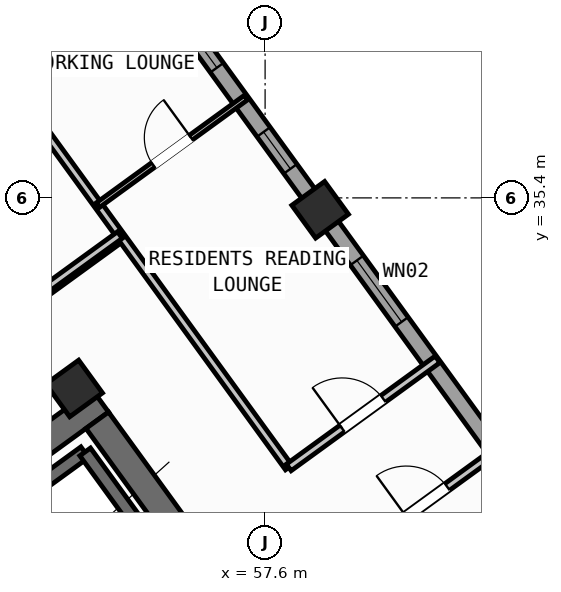
"""IFC4 building model, lengths in metres.
Left out: names, types, materials, properties, quantities, classifications, styles, units other than length and angle.
Written with IfcOpenShell. Run it as: python <this file> out.ifc"""

import sys

from ifc_helpers import new_model, si_unit, direction, frame, frame_2d, origin, origin_2d, place, context, subcontext, project, spatial, rectangle, hollow_rectangle, extrude, source, transform, mapped, element, fill, save


model = new_model("IFC4")
c1 = context("Model", 3, precision=1e-05, world=origin(), true_north=direction((0.0, 1.0)))
c2 = subcontext(c1, "Body", "Model", "MODEL_VIEW")
j1 = project(units=[si_unit("LENGTHUNIT", "METRE"), si_unit("PLANEANGLEUNIT", "RADIAN")], contexts=[c1])
p1 = place(None, origin())
s1 = spatial("IfcSite", under=j1, at=p1, CompositionType="ELEMENT")
p2 = place(p1, origin())
s2 = spatial("IfcBuilding", under=s1, at=p2, CompositionType="ELEMENT")
p3 = place(p2, frame((0.0, 0.0, 184.2)))
s3 = spatial("IfcBuildingStorey", under=s2, at=p3, CompositionType="ELEMENT", Elevation=184.2)
p4 = place(p3, frame((44.365, 24.142, 0.0), z_axis=(0.0, 0.0, 1.0), x_axis=(0.809024304885, 0.587775190107, 0.0)))
e1 = element("IfcWall", 1, at=p4, inside=s3, PredefinedType="SHEAR", context=c2, shape_type="SweptSolid", body=[
    extrude(rectangle(XDim=12.34, YDim=0.55, at=frame_2d((6.17, 0.0))), origin(), (0.0, 0.0, 1.0), 3.35),
])
p5 = place(p3, frame((58.064, 25.813, 0.0), z_axis=(0.0, 0.0, 1.0), x_axis=(-0.587764933797, 0.809031756236, 0.0)))
e2 = element("IfcWall", 2, at=p5, inside=s3, PredefinedType="SHEAR", context=c2, shape_type="SweptSolid", body=[
    extrude(rectangle(XDim=6.425, YDim=0.55, at=frame_2d((3.212, 0.0))), origin(), (0.0, 0.0, 1.0), 3.35),
])
m1 = source(origin(), c2, "Body", "SweptSolid", [
    extrude(hollow_rectangle(XDim=0.8, YDim=0.8, WallThickness=0.032, at=origin_2d()), origin(), (0.0, 0.0, 1.0), 3.6),
])
for number, where, z_axis, x_axis in (
    (3, (53.832, 31.638, 0.0), (0.0, 0.0, 1.0), (0.809, 0.588, 0.0)),
    (4, (58.686, 35.165, 0.0), (0.0, 0.0, 1.0), (0.809, 0.588, 0.0)),
):
    element("IfcColumn", number, at=place(p3, frame(where, z_axis=z_axis, x_axis=x_axis)), inside=s3, PredefinedType="COLUMN", context=c2, shape_type="MappedRepresentation", body=[
        mapped(m1, transform((0.0, 0.0, 0.0), scale=1.0)),
    ])
p6 = place(p3, frame((42.207, 31.597, 0.0), z_axis=(0.0, 0.0, 1.0), x_axis=(0.809020333377, 0.587780656523, 0.0)))
e5 = element("IfcWall", 5, at=p6, inside=s3, PredefinedType="STANDARD", context=c2, shape_type="SweptSolid", body=[
    extrude(rectangle(XDim=15.223, YDim=0.32, at=frame_2d((7.611, 0.0))), origin(), (0.0, 0.0, 1.0), 3.35),
])
p7 = place(p6, frame((12.82, 0.0, 0.0)))
e6 = element("IfcOpeningElement", 6, at=p7, cuts=e5, PredefinedType="OPENING", context=c2, shape_type="SweptSolid", body=[
    extrude(rectangle(XDim=1.05, YDim=2.15, at=frame_2d((0.525, 1.075))), frame((0.0, 0.17, 0.0), z_axis=(0.0, -1.0, 0.0), x_axis=(1.0, 0.0, 0.0)), (0.0, 0.0, 1.0), 0.34),
])
p8 = place(p6, frame((0.775, 0.0, 0.85)))
e7 = element("IfcOpeningElement", 7, at=p8, cuts=e5, PredefinedType="OPENING", context=c2, shape_type="SweptSolid", body=[
    extrude(rectangle(XDim=1.8, YDim=1.5, at=frame_2d((0.9, 0.75))), frame((0.0, 0.17, 0.0), z_axis=(0.0, -1.0, 0.0), x_axis=(1.0, 0.0, 0.0)), (0.0, 0.0, 1.0), 0.34),
])
p9 = place(p6, frame((5.544, 0.0, 0.85)))
e8 = element("IfcOpeningElement", 8, at=p9, cuts=e5, PredefinedType="OPENING", context=c2, shape_type="SweptSolid", body=[
    extrude(rectangle(XDim=1.8, YDim=1.5, at=frame_2d((0.9, 0.75))), frame((0.0, 0.17, 0.0), z_axis=(0.0, -1.0, 0.0), x_axis=(1.0, 0.0, 0.0)), (0.0, 0.0, 1.0), 0.34),
])
p10 = place(p6, frame((10.219, 0.0, 1.0)))
e9 = element("IfcOpeningElement", 9, at=p10, cuts=e5, PredefinedType="OPENING", context=c2, shape_type="SweptSolid", body=[
    extrude(rectangle(XDim=0.9, YDim=1.25, at=frame_2d((0.45, 0.625))), frame((0.0, 0.17, 0.0), z_axis=(0.0, -1.0, 0.0), x_axis=(1.0, 0.0, 0.0)), (0.0, 0.0, 1.0), 0.34),
])
p11 = place(p3, frame((54.81, 40.5, 0.0), z_axis=(0.0, 0.0, 1.0), x_axis=(0.587783625747, -0.809018176127, 0.0)))
e10 = element("IfcWall", 10, at=p11, inside=s3, PredefinedType="STANDARD", context=c2, shape_type="SweptSolid", body=[
    extrude(rectangle(XDim=21.587, YDim=0.32, at=frame_2d((10.794, 0.0))), origin(), (0.0, 0.0, 1.0), 2.825),
])
p12 = place(p11, frame((1.328, 0.0, 0.85)))
e11 = element("IfcOpeningElement", 11, at=p12, cuts=e10, PredefinedType="OPENING", context=c2, shape_type="SweptSolid", body=[
    extrude(rectangle(XDim=1.8, YDim=1.5, at=frame_2d((0.9, 0.75))), frame((0.0, 0.17, 0.0), z_axis=(0.0, -1.0, 0.0), x_axis=(1.0, 0.0, 0.0)), (0.0, 0.0, 1.0), 0.34),
])
p13 = place(p11, frame((4.695, 0.0, 1.0)))
e12 = element("IfcOpeningElement", 12, at=p13, cuts=e10, PredefinedType="OPENING", context=c2, shape_type="SweptSolid", body=[
    extrude(rectangle(XDim=0.9, YDim=1.25, at=frame_2d((0.45, 0.625))), frame((0.0, 0.17, 0.0), z_axis=(0.0, -1.0, 0.0), x_axis=(1.0, 0.0, 0.0)), (0.0, 0.0, 1.0), 0.34),
])
p14 = place(p11, frame((7.829, 0.0, 0.85)))
e13 = element("IfcOpeningElement", 13, at=p14, cuts=e10, PredefinedType="OPENING", context=c2, shape_type="SweptSolid", body=[
    extrude(rectangle(XDim=1.5, YDim=1.5, at=frame_2d((0.75, 0.75))), frame((0.0, 0.17, 0.0), z_axis=(0.0, -1.0, 0.0), x_axis=(1.0, 0.0, 0.0)), (0.0, 0.0, 1.0), 0.34),
])
p15 = place(p11, frame((15.542, 0.0, 0.95)))
e14 = element("IfcOpeningElement", 14, at=p15, cuts=e10, PredefinedType="OPENING", context=c2, shape_type="SweptSolid", body=[
    extrude(rectangle(XDim=1.2, YDim=1.4, at=frame_2d((0.6, 0.7))), frame((0.0, 0.17, 0.0), z_axis=(0.0, -1.0, 0.0), x_axis=(1.0, 0.0, 0.0)), (0.0, 0.0, 1.0), 0.34),
])
p16 = place(p11, frame((19.097, 0.0, 1.0)))
e15 = element("IfcOpeningElement", 15, at=p16, cuts=e10, PredefinedType="OPENING", context=c2, shape_type="SweptSolid", body=[
    extrude(rectangle(XDim=0.9, YDim=1.25, at=frame_2d((0.45, 0.625))), frame((0.0, 0.17, 0.0), z_axis=(0.0, -1.0, 0.0), x_axis=(1.0, 0.0, 0.0)), (0.0, 0.0, 1.0), 0.34),
])
p17 = place(p3, frame((48.006, 25.996, 0.0), z_axis=(0.0, 0.0, 1.0), x_axis=(0.80901903764, 0.587782439969, 0.0)))
e16 = element("IfcWall", 16, at=p17, inside=s3, PredefinedType="SHEAR", context=c2, shape_type="SweptSolid", body=[
    extrude(rectangle(XDim=7.46, YDim=0.26, at=frame_2d((3.73, 0.0))), origin(), (0.0, 0.0, 1.0), 3.35),
])
p18 = place(p3, frame((55.906, 27.831, 0.0), z_axis=(0.0, 0.0, 1.0), x_axis=(-0.587804123638, 0.809003283204, 0.0)))
e17 = element("IfcWall", 17, at=p18, inside=s3, PredefinedType="SHEAR", context=c2, shape_type="SweptSolid", body=[
    extrude(rectangle(XDim=3.16, YDim=0.26, at=frame_2d((1.58, 0.0))), origin(), (0.0, 0.0, 1.0), 3.35),
])
p19 = place(p3, frame((52.739, 33.143, 0.0), z_axis=(0.0, 0.0, 1.0), x_axis=(0.809000999347, 0.58780726693, 0.0)))
e18 = element("IfcWall", 18, at=p19, inside=s3, PredefinedType="PARTITIONING", context=c2, shape_type="SweptSolid", body=[
    extrude(rectangle(XDim=2.51, YDim=0.16, at=frame_2d((1.255, 0.0))), origin(), (0.0, 0.0, 1.0), 3.34),
])
p20 = place(p3, frame((58.067, 30.08, 0.0), z_axis=(0.0, 0.0, 1.0), x_axis=(-0.587787785243, 0.809015154073, 0.0)))
e19 = element("IfcWall", 19, at=p20, inside=s3, PredefinedType="PARTITIONING", context=c2, shape_type="SweptSolid", body=[
    extrude(rectangle(XDim=10.4, YDim=0.16, at=frame_2d((5.2, 0.0))), origin(), (0.0, 0.0, 1.0), 3.34),
])
p21 = place(p3, frame((59.331, 28.341, 0.0), z_axis=(0.0, 0.0, 1.0), x_axis=(0.809003564202, 0.587803736896, 0.0)))
e20 = element("IfcWall", 20, at=p21, inside=s3, PredefinedType="PARTITIONING", context=c2, shape_type="SweptSolid", body=[
    extrude(rectangle(XDim=3.63, YDim=0.16, at=frame_2d((1.815, 0.0))), origin(), (0.0, 0.0, 1.0), 3.34),
])
p22 = place(p21, frame((1.305, 0.0, 0.0)))
e21 = element("IfcOpeningElement", 21, at=p22, cuts=e20, PredefinedType="OPENING", context=c2, shape_type="SweptSolid", body=[
    extrude(rectangle(XDim=1.0, YDim=2.1, at=frame_2d((0.5, 1.05))), frame((0.0, 0.09, 0.0), z_axis=(0.0, -1.0, 0.0), x_axis=(1.0, 0.0, 0.0)), (0.0, 0.0, 1.0), 0.18),
])
p23 = place(p3, frame((58.067, 30.08, 0.0), z_axis=(0.0, 0.0, 1.0), x_axis=(0.809012309495, 0.587791700422, 0.0)))
e22 = element("IfcWall", 22, at=p23, inside=s3, PredefinedType="PARTITIONING", context=c2, shape_type="SweptSolid", body=[
    extrude(rectangle(XDim=3.63, YDim=0.16, at=frame_2d((1.815, 0.0))), origin(), (0.0, 0.0, 1.0), 3.34),
])
p24 = place(p23, frame((1.305, 0.0, 0.0)))
e23 = element("IfcOpeningElement", 23, at=p24, cuts=e22, PredefinedType="OPENING", context=c2, shape_type="SweptSolid", body=[
    extrude(rectangle(XDim=1.0, YDim=2.1, at=frame_2d((0.5, 1.05))), frame((0.0, 0.09, 0.0), z_axis=(0.0, -1.0, 0.0), x_axis=(1.0, 0.0, 0.0)), (0.0, 0.0, 1.0), 0.18),
])
p25 = place(p3, frame((54.304, 35.259, 0.0), z_axis=(0.0, 0.0, 1.0), x_axis=(0.809005039917, 0.58780170584, 0.0)))
e24 = element("IfcWall", 24, at=p25, inside=s3, PredefinedType="PARTITIONING", context=c2, shape_type="SweptSolid", body=[
    extrude(rectangle(XDim=3.61, YDim=0.11, at=frame_2d((1.805, 0.0))), origin(), (0.0, 0.0, 1.0), 3.34),
])
p26 = place(p25, frame((1.345, 0.0, 0.0)))
e25 = element("IfcOpeningElement", 25, at=p26, cuts=e24, PredefinedType="OPENING", context=c2, shape_type="SweptSolid", body=[
    extrude(rectangle(XDim=0.92, YDim=2.08, at=frame_2d((0.46, 1.04))), frame((0.0, 0.065, 0.0), z_axis=(0.0, -1.0, 0.0), x_axis=(1.0, 0.0, 0.0)), (0.0, 0.0, 1.0), 0.13),
])
p27 = place(p3, frame((42.866, 26.044, 0.0), z_axis=(0.0, 0.0, 1.0), x_axis=(0.809020254154, 0.587780765566, 0.0)))
e26 = element("IfcWall", 26, at=p27, inside=s3, PredefinedType="PARTITIONING", context=c2, shape_type="SweptSolid", body=[
    extrude(rectangle(XDim=14.67, YDim=0.16, at=frame_2d((7.335, 0.0))), origin(), (0.0, 0.0, 1.0), 3.34),
])
p28 = place(p27, frame((3.215, 0.0, 0.0)))
e27 = element("IfcOpeningElement", 27, at=p28, cuts=e26, PredefinedType="OPENING", context=c2, shape_type="SweptSolid", body=[
    extrude(rectangle(XDim=1.0, YDim=2.1, at=frame_2d((0.5, 1.05))), frame((0.0, 0.09, 0.0), z_axis=(0.0, -1.0, 0.0), x_axis=(1.0, 0.0, 0.0)), (0.0, 0.0, 1.0), 0.18),
])
p29 = place(p27, frame((9.915, 0.0, 0.0)))
e28 = element("IfcOpeningElement", 28, at=p29, cuts=e26, PredefinedType="OPENING", context=c2, shape_type="SweptSolid", body=[
    extrude(rectangle(XDim=1.0, YDim=2.1, at=frame_2d((0.5, 1.05))), frame((0.0, 0.09, 0.0), z_axis=(0.0, -1.0, 0.0), x_axis=(1.0, 0.0, 0.0)), (0.0, 0.0, 1.0), 0.18),
])
m2 = source(origin(), c2, "Body", "SweptSolid", [
    extrude(rectangle(XDim=1.8, YDim=1.5, at=frame_2d((0.9, 0.75))), frame((0.0, 0.03, 0.0), z_axis=(0.0, -1.0, 0.0), x_axis=(1.0, 0.0, 0.0)), (0.0, 0.0, 1.0), 0.06),
])
p30 = place(p12, origin())
e29 = element("IfcWindow", 29, at=p30, inside=s3, PartitioningType="SINGLE_PANEL", PredefinedType="WINDOW", context=c2, shape_type="MappedRepresentation", body=[
    mapped(m2, transform((0.0, 0.0, 0.0), scale=1.0)),
])
fill(e11, e29)
m3 = source(origin(), c2, "Body", "SweptSolid", [
    extrude(rectangle(XDim=0.9, YDim=1.25, at=frame_2d((0.45, 0.625))), frame((0.0, 0.03, 0.0), z_axis=(0.0, -1.0, 0.0), x_axis=(1.0, 0.0, 0.0)), (0.0, 0.0, 1.0), 0.06),
])
p31 = place(p13, origin())
e30 = element("IfcWindow", 30, at=p31, inside=s3, PartitioningType="SINGLE_PANEL", PredefinedType="WINDOW", context=c2, shape_type="MappedRepresentation", body=[
    mapped(m3, transform((0.0, 0.0, 0.0), scale=1.0)),
])
fill(e12, e30)
m4 = source(origin(), c2, "Body", "SweptSolid", [
    extrude(rectangle(XDim=1.5, YDim=1.5, at=frame_2d((0.75, 0.75))), frame((0.0, 0.03, 0.0), z_axis=(0.0, -1.0, 0.0), x_axis=(1.0, 0.0, 0.0)), (0.0, 0.0, 1.0), 0.06),
])
p32 = place(p14, origin())
e31 = element("IfcWindow", 31, at=p32, inside=s3, PartitioningType="SINGLE_PANEL", PredefinedType="WINDOW", context=c2, shape_type="MappedRepresentation", body=[
    mapped(m4, transform((0.0, 0.0, 0.0), scale=1.0)),
])
fill(e13, e31)
m5 = source(origin(), c2, "Body", "SweptSolid", [
    extrude(rectangle(XDim=1.0, YDim=2.1, at=frame_2d((0.5, 1.05))), frame((0.0, 0.025, 0.0), z_axis=(0.0, -1.0, 0.0), x_axis=(1.0, 0.0, 0.0)), (0.0, 0.0, 1.0), 0.05),
])
p33 = place(p24, origin())
e32 = element("IfcDoor", 32, at=p33, inside=s3, OperationType="SINGLE_SWING_LEFT", PredefinedType="DOOR", context=c2, shape_type="MappedRepresentation", body=[
    mapped(m5, transform((0.0, 0.0, 0.0), scale=1.0)),
])
fill(e23, e32)
m6 = source(origin(), c2, "Body", "SweptSolid", [
    extrude(rectangle(XDim=0.92, YDim=2.08, at=frame_2d((0.46, 1.04))), frame((0.0, 0.025, 0.0), z_axis=(0.0, -1.0, 0.0), x_axis=(1.0, 0.0, 0.0)), (0.0, 0.0, 1.0), 0.05),
])
p34 = place(p26, origin())
e33 = element("IfcDoor", 33, at=p34, inside=s3, OperationType="SINGLE_SWING_RIGHT", PredefinedType="DOOR", context=c2, shape_type="MappedRepresentation", body=[
    mapped(m6, transform((0.0, 0.0, 0.0), scale=1.0)),
])
fill(e25, e33)
p35 = place(p22, origin())
e34 = element("IfcDoor", 34, at=p35, inside=s3, OperationType="SINGLE_SWING_LEFT", PredefinedType="DOOR", context=c2, shape_type="MappedRepresentation", body=[
    mapped(m5, transform((0.0, 0.0, 0.0), scale=1.0)),
])
fill(e21, e34)
save(model, sys.argv[1])
